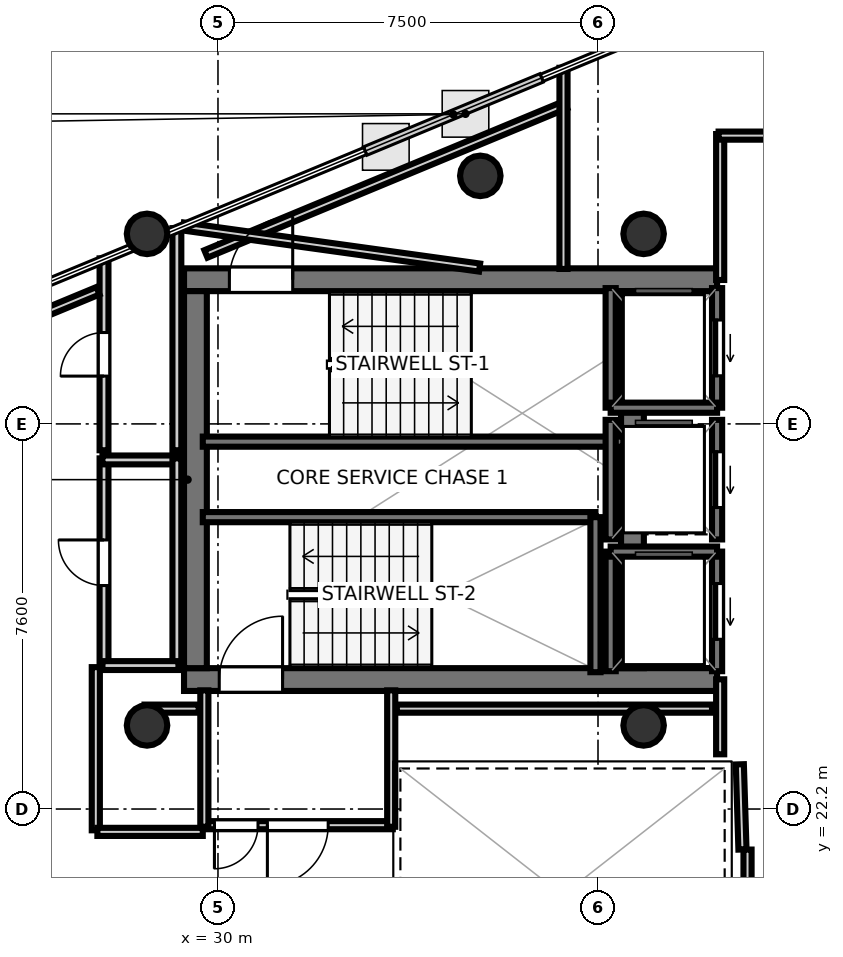
"""IFC4 building model, lengths in metres.
Left out: names, types, materials, properties, quantities, classifications, styles, units other than length and angle.
Written with IfcOpenShell. Run it as: python <this file> out.ifc"""

import sys

from ifc_helpers import new_model, si_unit, direction, frame, frame_2d, origin, origin_2d, place, context, subcontext, project, spatial, rectangle, hollow_circle, extrude, element, fill, save


model = new_model("IFC4")
c1 = context("Model", 3, precision=1e-05, world=origin(), true_north=direction((0.0, 1.0)))
c2 = subcontext(c1, "Body", "Model", "MODEL_VIEW")
j1 = project(units=[si_unit("LENGTHUNIT", "METRE"), si_unit("PLANEANGLEUNIT", "RADIAN")], contexts=[c1])
p1 = place(None, origin())
s1 = spatial("IfcSite", under=j1, at=p1, CompositionType="ELEMENT")
p2 = place(p1, origin())
s2 = spatial("IfcBuilding", under=s1, at=p2, CompositionType="ELEMENT")
p3 = place(p2, frame((0.0, 0.0, 348.1)))
s3 = spatial("IfcBuildingStorey", under=s2, at=p3, CompositionType="ELEMENT", Elevation=348.1)
p4 = place(p3, frame((29.33, 32.645, 0.0), z_axis=(0.0, 0.0, 1.0), x_axis=(1.0, 0.0, 0.0)))
e1 = element("IfcWall", 1, at=p4, inside=s3, PredefinedType="SHEAR", context=c2, shape_type="SweptSolid", body=[
    extrude(rectangle(XDim=10.52, YDim=0.45, at=frame_2d((5.26, 0.0))), origin(), (0.0, 0.0, 1.0), 3.4),
])
p5 = place(p4, frame((0.895, 0.0, 0.0)))
e2 = element("IfcOpeningElement", 2, at=p5, cuts=e1, PredefinedType="OPENING", context=c2, shape_type="SweptSolid", body=[
    extrude(rectangle(XDim=1.25, YDim=2.15, at=frame_2d((0.625, 1.075))), frame((0.0, 0.235, 0.0), z_axis=(0.0, -1.0, 0.0), x_axis=(1.0, 0.0, 0.0)), (0.0, 0.0, 1.0), 0.47),
])
p6 = place(p3, frame((29.33, 24.755, 0.0), z_axis=(0.0, 0.0, 1.0), x_axis=(1.0, 0.0, 0.0)))
e3 = element("IfcWall", 3, at=p6, inside=s3, PredefinedType="SHEAR", context=c2, shape_type="SweptSolid", body=[
    extrude(rectangle(XDim=10.52, YDim=0.45, at=frame_2d((5.26, 0.0))), origin(), (0.0, 0.0, 1.0), 3.4),
])
p7 = place(p6, frame((0.695, 0.0, 0.0)))
e4 = element("IfcOpeningElement", 4, at=p7, cuts=e3, PredefinedType="OPENING", context=c2, shape_type="SweptSolid", body=[
    extrude(rectangle(XDim=1.25, YDim=2.15, at=frame_2d((0.625, 1.075))), frame((0.0, 0.235, 0.0), z_axis=(0.0, -1.0, 0.0), x_axis=(1.0, 0.0, 0.0)), (0.0, 0.0, 1.0), 0.47),
])
for number, where, z_axis, x_axis in (
    (5, (29.555, 24.98, 0.0), (0.0, 0.0, 1.0), (0.0, 1.0, 0.0)),
    (6, (38.18, 24.98, 0.0), (0.0, 0.0, 1.0), (0.0, 1.0, 0.0)),
):
    element("IfcWall", number, at=place(p3, frame(where, z_axis=z_axis, x_axis=x_axis)), inside=s3, PredefinedType="SHEAR", context=c2, shape_type="SweptSolid", body=[
        extrude(rectangle(XDim=7.44, YDim=0.45, at=frame_2d((3.72, 0.0))), origin(), (0.0, 0.0, 1.0), 3.4),
    ])
for number, where, z_axis, x_axis in (
    (7, (28.6, 33.55, 0.0), (0.0, 0.0, 1.0), (1.0, 0.0, 0.0)),
    (8, (28.6, 23.85, 0.0), (0.0, 0.0, 1.0), (1.0, 0.0, 0.0)),
    (9, (38.4, 33.55, 0.0), (0.0, 0.0, 1.0), (1.0, 0.0, 0.0)),
    (10, (38.4, 23.85, 0.0), (0.0, 0.0, 1.0), (1.0, 0.0, 0.0)),
    (11, (35.177, 34.695, 0.0), (0.0, 0.0, 1.0), (1.0, 0.0, 0.0)),
):
    element("IfcColumn", number, at=place(p3, frame(where, z_axis=z_axis, x_axis=x_axis)), inside=s3, PredefinedType="COLUMN", context=c2, shape_type="SweptSolid", body=[
        extrude(hollow_circle(Radius=0.4, WallThickness=0.022, at=origin_2d()), origin(), (0.0, 0.0, 1.0), 3.7),
    ])
p8 = place(p3, frame((29.7, 29.45, 0.0), z_axis=(0.0, 0.0, 1.0), x_axis=(1.0, 0.0, 0.0)))
e12 = element("IfcWall", 12, at=p8, inside=s3, PredefinedType="SOLIDWALL", context=c2, shape_type="SweptSolid", body=[
    extrude(rectangle(XDim=8.3, YDim=0.2, at=frame_2d((4.15, 0.0))), origin(), (0.0, 0.0, 1.0), 3.4),
])
p9 = place(p3, frame((29.7, 27.96, 0.0), z_axis=(0.0, 0.0, 1.0), x_axis=(1.0, 0.0, 0.0)))
e13 = element("IfcWall", 13, at=p9, inside=s3, PredefinedType="SOLIDWALL", context=c2, shape_type="SweptSolid", body=[
    extrude(rectangle(XDim=7.75, YDim=0.2, at=frame_2d((3.875, 0.0))), origin(), (0.0, 0.0, 1.0), 3.4),
])
p10 = place(p3, frame((37.45, 24.9, 0.0), z_axis=(0.0, 0.0, 1.0), x_axis=(0.0, 1.0, 0.0)))
e14 = element("IfcWall", 14, at=p10, inside=s3, PredefinedType="SOLIDWALL", context=c2, shape_type="SweptSolid", body=[
    extrude(rectangle(XDim=3.06, YDim=0.2, at=frame_2d((1.53, 0.0))), origin(), (0.0, 0.0, 1.0), 3.4),
])
p11 = place(p3, frame((39.85, 30.12, 0.0), z_axis=(0.0, 0.0, 1.0), x_axis=(0.0, 1.0, 0.0)))
e15 = element("IfcWall", 15, at=p11, inside=s3, PredefinedType="SOLIDWALL", context=c2, shape_type="SweptSolid", body=[
    extrude(rectangle(XDim=2.36, YDim=0.2, at=frame_2d((1.18, 0.0))), origin(), (0.0, 0.0, 1.0), 3.4),
])
p12 = place(p11, frame((0.63, 0.0, 0.0)))
e16 = element("IfcOpeningElement", 16, at=p12, cuts=e15, PredefinedType="OPENING", context=c2, shape_type="SweptSolid", body=[
    extrude(rectangle(XDim=1.1, YDim=2.15, at=frame_2d((0.55, 1.075))), frame((0.0, 0.11, 0.0), z_axis=(0.0, -1.0, 0.0), x_axis=(1.0, 0.0, 0.0)), (0.0, 0.0, 1.0), 0.22),
])
p13 = place(p3, frame((37.75, 30.12, 0.0), z_axis=(0.0, 0.0, 1.0), x_axis=(0.0, 1.0, 0.0)))
e17 = element("IfcWall", 17, at=p13, inside=s3, PredefinedType="SOLIDWALL", context=c2, shape_type="SweptSolid", body=[
    extrude(rectangle(XDim=2.36, YDim=0.2, at=frame_2d((1.18, 0.0))), origin(), (0.0, 0.0, 1.0), 3.4),
])
p14 = place(p3, frame((37.75, 30.12, 0.0), z_axis=(0.0, 0.0, 1.0), x_axis=(1.0, 0.0, 0.0)))
e18 = element("IfcWall", 18, at=p14, inside=s3, PredefinedType="SOLIDWALL", context=c2, shape_type="SweptSolid", body=[
    extrude(rectangle(XDim=2.1, YDim=0.2, at=frame_2d((1.05, 0.0))), origin(), (0.0, 0.0, 1.0), 3.4),
])
p15 = place(p3, frame((39.85, 24.92, 0.0), z_axis=(0.0, 0.0, 1.0), x_axis=(0.0, 1.0, 0.0)))
e19 = element("IfcWall", 19, at=p15, inside=s3, PredefinedType="SOLIDWALL", context=c2, shape_type="SweptSolid", body=[
    extrude(rectangle(XDim=2.36, YDim=0.2, at=frame_2d((1.18, 0.0))), origin(), (0.0, 0.0, 1.0), 3.4),
])
p16 = place(p15, frame((0.63, 0.0, 0.0)))
e20 = element("IfcOpeningElement", 20, at=p16, cuts=e19, PredefinedType="OPENING", context=c2, shape_type="SweptSolid", body=[
    extrude(rectangle(XDim=1.1, YDim=2.15, at=frame_2d((0.55, 1.075))), frame((0.0, 0.11, 0.0), z_axis=(0.0, -1.0, 0.0), x_axis=(1.0, 0.0, 0.0)), (0.0, 0.0, 1.0), 0.22),
])
p17 = place(p3, frame((37.75, 24.92, 0.0), z_axis=(0.0, 0.0, 1.0), x_axis=(0.0, 1.0, 0.0)))
e21 = element("IfcWall", 21, at=p17, inside=s3, PredefinedType="SOLIDWALL", context=c2, shape_type="SweptSolid", body=[
    extrude(rectangle(XDim=2.36, YDim=0.2, at=frame_2d((1.18, 0.0))), origin(), (0.0, 0.0, 1.0), 3.4),
])
p18 = place(p3, frame((37.75, 27.28, 0.0), z_axis=(0.0, 0.0, 1.0), x_axis=(1.0, 0.0, 0.0)))
e22 = element("IfcWall", 22, at=p18, inside=s3, PredefinedType="SOLIDWALL", context=c2, shape_type="SweptSolid", body=[
    extrude(rectangle(XDim=2.1, YDim=0.2, at=frame_2d((1.05, 0.0))), origin(), (0.0, 0.0, 1.0), 3.4),
])
p19 = place(p3, frame((39.85, 27.52, 0.0), z_axis=(0.0, 0.0, 1.0), x_axis=(0.0, 1.0, 0.0)))
e23 = element("IfcWall", 23, at=p19, inside=s3, PredefinedType="SOLIDWALL", context=c2, shape_type="SweptSolid", body=[
    extrude(rectangle(XDim=2.36, YDim=0.2, at=frame_2d((1.18, 0.0))), origin(), (0.0, 0.0, 1.0), 3.4),
])
p20 = place(p19, frame((0.63, 0.0, 0.0)))
e24 = element("IfcOpeningElement", 24, at=p20, cuts=e23, PredefinedType="OPENING", context=c2, shape_type="SweptSolid", body=[
    extrude(rectangle(XDim=1.1, YDim=2.15, at=frame_2d((0.55, 1.075))), frame((0.0, 0.11, 0.0), z_axis=(0.0, -1.0, 0.0), x_axis=(1.0, 0.0, 0.0)), (0.0, 0.0, 1.0), 0.22),
])
p21 = place(p3, frame((37.75, 27.52, 0.0), z_axis=(0.0, 0.0, 1.0), x_axis=(0.0, 1.0, 0.0)))
e25 = element("IfcWall", 25, at=p21, inside=s3, PredefinedType="SOLIDWALL", context=c2, shape_type="SweptSolid", body=[
    extrude(rectangle(XDim=2.36, YDim=0.2, at=frame_2d((1.18, 0.0))), origin(), (0.0, 0.0, 1.0), 3.4),
])
p22 = place(p3, frame((29.762, 33.154, 0.0), z_axis=(0.0, 0.0, 1.0), x_axis=(0.923696881278, 0.38312409415, 0.0)))
e26 = element("IfcWall", 26, at=p22, inside=s3, PredefinedType="PARTITIONING", context=c2, shape_type="SweptSolid", body=[
    extrude(rectangle(XDim=7.686, YDim=0.16, at=frame_2d((3.843, 0.0))), origin(), (0.0, 0.0, 1.0), 2.178),
])
p23 = place(p3, frame((36.819, 36.828, 0.0), z_axis=(0.0, 0.0, 1.0), x_axis=(0.0, -1.0, 0.0)))
e27 = element("IfcWall", 27, at=p23, inside=s3, PredefinedType="PARTITIONING", context=c2, shape_type="SweptSolid", body=[
    extrude(rectangle(XDim=3.97, YDim=0.16, at=frame_2d((1.985, 0.0))), origin(), (0.0, 0.0, 1.0), 2.178),
])
p24 = place(p3, frame((35.163, 32.885, 0.0), z_axis=(0.0, 0.0, 1.0), x_axis=(-0.990514647944, 0.137407176701, 0.0)))
e28 = element("IfcWall", 28, at=p24, inside=s3, PredefinedType="PARTITIONING", context=c2, shape_type="SweptSolid", body=[
    extrude(rectangle(XDim=5.902, YDim=0.16, at=frame_2d((2.951, 0.0))), origin(), (0.0, 0.0, 1.0), 2.35),
])
p25 = place(p3, frame((33.45, 21.881, 0.0), z_axis=(0.0, 0.0, 1.0), x_axis=(-1.0, 0.0, 0.0)))
e29 = element("IfcWall", 29, at=p25, inside=s3, PredefinedType="PARTITIONING", context=c2, shape_type="SweptSolid", body=[
    extrude(rectangle(XDim=3.75, YDim=0.16, at=frame_2d((1.875, 0.0))), origin(), (0.0, 0.0, 1.0), 2.35),
])
p26 = place(p25, frame((1.275, 0.0, 0.0)))
e30 = element("IfcOpeningElement", 30, at=p26, cuts=e29, PredefinedType="OPENING", context=c2, shape_type="SweptSolid", body=[
    extrude(rectangle(XDim=1.2, YDim=2.15, at=frame_2d((0.6, 1.075))), frame((0.0, 0.09, 0.0), z_axis=(0.0, -1.0, 0.0), x_axis=(1.0, 0.0, 0.0)), (0.0, 0.0, 1.0), 0.18),
])
p27 = place(p25, frame((2.66, 0.0, 0.0)))
e31 = element("IfcOpeningElement", 31, at=p27, cuts=e29, PredefinedType="OPENING", context=c2, shape_type="SweptSolid", body=[
    extrude(rectangle(XDim=0.86, YDim=2.05, at=frame_2d((0.43, 1.025))), frame((0.0, 0.09, 0.0), z_axis=(0.0, -1.0, 0.0), x_axis=(1.0, 0.0, 0.0)), (0.0, 0.0, 1.0), 0.18),
])
for number, where, z_axis, x_axis in (
    (32, (29.731, 21.85, 0.0), (0.0, 0.0, 1.0), (0.0, 1.0, 0.0)),
    (33, (33.419, 24.542, 0.0), (0.0, 0.0, 1.0), (0.0, -1.0, 0.0)),
):
    element("IfcWall", number, at=place(p3, frame(where, z_axis=z_axis, x_axis=x_axis)), inside=s3, PredefinedType="PARTITIONING", context=c2, shape_type="SweptSolid", body=[
        extrude(rectangle(XDim=2.692, YDim=0.16, at=frame_2d((1.346, 0.0))), origin(), (0.0, 0.0, 1.0), 2.35),
    ])
p28 = place(p3, frame((40.351, 21.401, 0.0), z_axis=(0.0, 0.0, 1.0), x_axis=(-0.031058045979, 0.999517582527, 0.0)))
e34 = element("IfcWall", 34, at=p28, inside=s3, PredefinedType="PARTITIONING", context=c2, shape_type="SweptSolid", body=[
    extrude(rectangle(XDim=1.682, YDim=0.16, at=frame_2d((0.841, 0.0))), origin(), (0.0, 0.0, 1.0), 2.35),
])
p29 = place(p3, frame((39.911, 23.28, 0.0), z_axis=(0.0, 0.0, 1.0), x_axis=(0.0, 1.0, 0.0)))
e35 = element("IfcWall", 35, at=p29, inside=s3, PredefinedType="PARTITIONING", context=c2, shape_type="SweptSolid", body=[
    extrude(rectangle(XDim=1.48, YDim=0.16, at=frame_2d((0.74, 0.0))), origin(), (0.0, 0.0, 1.0), 2.35),
])
p30 = place(p3, frame((39.911, 32.64, 0.0), z_axis=(0.0, 0.0, 1.0), x_axis=(0.0, 1.0, 0.0)))
e36 = element("IfcWall", 36, at=p30, inside=s3, PredefinedType="PARTITIONING", context=c2, shape_type="SweptSolid", body=[
    extrude(rectangle(XDim=2.88, YDim=0.16, at=frame_2d((1.44, 0.0))), origin(), (0.0, 0.0, 1.0), 2.35),
])
p31 = place(p3, frame((39.88, 35.489, 0.0), z_axis=(0.0, 0.0, 1.0), x_axis=(1.0, 0.0, 0.0)))
e37 = element("IfcWall", 37, at=p31, inside=s3, PredefinedType="PARTITIONING", context=c2, shape_type="SweptSolid", body=[
    extrude(rectangle(XDim=1.48, YDim=0.16, at=frame_2d((0.74, 0.0))), origin(), (0.0, 0.0, 1.0), 2.35),
])
p32 = place(p3, frame((40.451, 18.08, 0.0), z_axis=(0.0, 0.0, 1.0), x_axis=(0.0, 1.0, 0.0)))
e38 = element("IfcWall", 38, at=p32, inside=s3, PredefinedType="PARTITIONING", context=c2, shape_type="SweptSolid", body=[
    extrude(rectangle(XDim=3.32, YDim=0.16, at=frame_2d((1.66, 0.0))), origin(), (0.0, 0.0, 1.0), 2.35),
])
p33 = place(p3, frame((27.751, 25.0, 0.0), z_axis=(0.0, 0.0, 1.0), x_axis=(0.0, 1.0, 0.0)))
e39 = element("IfcWall", 39, at=p33, inside=s3, PredefinedType="PLUMBINGWALL", context=c2, shape_type="SweptSolid", body=[
    extrude(rectangle(XDim=4.12, YDim=0.175, at=frame_2d((2.06, 0.0))), origin(), (0.0, 0.0, 1.0), 2.35),
])
p34 = place(p33, frame((1.61, 0.0, 0.0)))
e40 = element("IfcOpeningElement", 40, at=p34, cuts=e39, PredefinedType="OPENING", context=c2, shape_type="SweptSolid", body=[
    extrude(rectangle(XDim=0.9, YDim=2.1, at=frame_2d((0.45, 1.05))), frame((0.0, 0.097, 0.0), z_axis=(0.0, -1.0, 0.0), x_axis=(1.0, 0.0, 0.0)), (0.0, 0.0, 1.0), 0.195),
])
p35 = place(p3, frame((27.72, 29.089, 0.0), z_axis=(0.0, 0.0, 1.0), x_axis=(1.0, 0.0, 0.0)))
e41 = element("IfcWall", 41, at=p35, inside=s3, PredefinedType="PLUMBINGWALL", context=c2, shape_type="SweptSolid", body=[
    extrude(rectangle(XDim=1.5, YDim=0.175, at=frame_2d((0.75, 0.0))), origin(), (0.0, 0.0, 1.0), 2.35),
])
p36 = place(p3, frame((29.189, 29.12, 0.0), z_axis=(0.0, 0.0, 1.0), x_axis=(0.0, -1.0, 0.0)))
e42 = element("IfcWall", 42, at=p36, inside=s3, PredefinedType="PLUMBINGWALL", context=c2, shape_type="SweptSolid", body=[
    extrude(rectangle(XDim=4.12, YDim=0.175, at=frame_2d((2.06, 0.0))), origin(), (0.0, 0.0, 1.0), 2.35),
])
p37 = place(p3, frame((29.22, 25.031, 0.0), z_axis=(0.0, 0.0, 1.0), x_axis=(-1.0, 0.0, 0.0)))
e43 = element("IfcWall", 43, at=p37, inside=s3, PredefinedType="PLUMBINGWALL", context=c2, shape_type="SweptSolid", body=[
    extrude(rectangle(XDim=1.5, YDim=0.175, at=frame_2d((0.75, 0.0))), origin(), (0.0, 0.0, 1.0), 2.35),
])
p38 = place(p3, frame((29.189, 33.663, 0.0), z_axis=(0.0, 0.0, 1.0), x_axis=(0.0, -1.0, 0.0)))
e44 = element("IfcWall", 44, at=p38, inside=s3, PredefinedType="PLUMBINGWALL", context=c2, shape_type="SweptSolid", body=[
    extrude(rectangle(XDim=4.383, YDim=0.175, at=frame_2d((2.191, 0.0))), origin(), (0.0, 0.0, 1.0), 2.35),
])
p39 = place(p3, frame((27.751, 29.28, 0.0), z_axis=(0.0, 0.0, 1.0), x_axis=(0.0, 1.0, 0.0)))
e45 = element("IfcWall", 45, at=p39, inside=s3, PredefinedType="PLUMBINGWALL", context=c2, shape_type="SweptSolid", body=[
    extrude(rectangle(XDim=3.787, YDim=0.175, at=frame_2d((1.893, 0.0))), origin(), (0.0, 0.0, 1.0), 2.35),
])
p40 = place(p39, frame((1.463, 0.0, 0.0)))
e46 = element("IfcOpeningElement", 46, at=p40, cuts=e45, PredefinedType="OPENING", context=c2, shape_type="SweptSolid", body=[
    extrude(rectangle(XDim=0.86, YDim=2.05, at=frame_2d((0.43, 1.025))), frame((0.0, 0.097, 0.0), z_axis=(0.0, -1.0, 0.0), x_axis=(1.0, 0.0, 0.0)), (0.0, 0.0, 1.0), 0.195),
])
p41 = place(p3, frame((29.62, 24.181, 0.0), z_axis=(0.0, 0.0, 1.0), x_axis=(-1.0, 0.0, 0.0)))
e47 = element("IfcWall", 47, at=p41, inside=s3, PredefinedType="PARTITIONING", context=c2, shape_type="SweptSolid", body=[
    extrude(rectangle(XDim=1.07, YDim=0.16, at=frame_2d((0.535, 0.0))), origin(), (0.0, 0.0, 1.0), 2.35),
])
p42 = place(p3, frame((39.75, 24.181, 0.0), z_axis=(0.0, 0.0, 1.0), x_axis=(-1.0, 0.0, 0.0)))
e48 = element("IfcWall", 48, at=p42, inside=s3, PredefinedType="PARTITIONING", context=c2, shape_type="SweptSolid", body=[
    extrude(rectangle(XDim=6.22, YDim=0.16, at=frame_2d((3.11, 0.0))), origin(), (0.0, 0.0, 1.0), 2.35),
])
p43 = place(p3, frame((25.662, 31.611, 0.0), z_axis=(0.0, 0.0, 1.0), x_axis=(0.923688761003, 0.38314367122, 0.0)))
e49 = element("IfcWall", 49, at=p43, inside=s3, PredefinedType="PARTITIONING", context=c2, shape_type="SweptSolid", body=[
    extrude(rectangle(XDim=2.133, YDim=0.16, at=frame_2d((1.066, 0.0))), origin(), (0.0, 0.0, 1.0), 2.35),
])
p44 = place(p3, frame((27.589, 25.0, 0.0), z_axis=(0.0, 0.0, 1.0), x_axis=(0.0, -1.0, 0.0)))
e50 = element("IfcWall", 50, at=p44, inside=s3, PredefinedType="PARTITIONING", context=c2, shape_type="SweptSolid", body=[
    extrude(rectangle(XDim=3.22, YDim=0.16, at=frame_2d((1.61, 0.0))), origin(), (0.0, 0.0, 1.0), 2.35),
])
p45 = place(p3, frame((27.62, 21.749, 0.0), z_axis=(0.0, 0.0, 1.0), x_axis=(1.0, 0.0, 0.0)))
e51 = element("IfcWall", 51, at=p45, inside=s3, PredefinedType="PARTITIONING", context=c2, shape_type="SweptSolid", body=[
    extrude(rectangle(XDim=2.08, YDim=0.16, at=frame_2d((1.04, 0.0))), origin(), (0.0, 0.0, 1.0), 2.35),
])
p46 = place(p5, origin())
e52 = element("IfcDoor", 52, at=p46, inside=s3, OperationType="SINGLE_SWING_RIGHT", PredefinedType="DOOR", context=c2, shape_type="SweptSolid", body=[
    extrude(rectangle(XDim=1.25, YDim=2.15, at=frame_2d((0.625, 1.075))), frame((0.0, 0.025, 0.0), z_axis=(0.0, -1.0, 0.0), x_axis=(1.0, 0.0, 0.0)), (0.0, 0.0, 1.0), 0.05),
])
fill(e2, e52)
p47 = place(p7, origin())
e53 = element("IfcDoor", 53, at=p47, inside=s3, OperationType="SINGLE_SWING_RIGHT", PredefinedType="DOOR", context=c2, shape_type="SweptSolid", body=[
    extrude(rectangle(XDim=1.25, YDim=2.15, at=frame_2d((0.625, 1.075))), frame((0.0, 0.025, 0.0), z_axis=(0.0, -1.0, 0.0), x_axis=(1.0, 0.0, 0.0)), (0.0, 0.0, 1.0), 0.05),
])
fill(e4, e53)
p48 = place(p12, origin())
e54 = element("IfcDoor", 54, at=p48, inside=s3, OperationType="SLIDING_TO_LEFT", PredefinedType="DOOR", context=c2, shape_type="SweptSolid", body=[
    extrude(rectangle(XDim=1.1, YDim=2.15, at=frame_2d((0.55, 1.075))), frame((0.0, 0.025, 0.0), z_axis=(0.0, -1.0, 0.0), x_axis=(1.0, 0.0, 0.0)), (0.0, 0.0, 1.0), 0.05),
])
fill(e16, e54)
p49 = place(p16, origin())
e55 = element("IfcDoor", 55, at=p49, inside=s3, OperationType="SLIDING_TO_LEFT", PredefinedType="DOOR", context=c2, shape_type="SweptSolid", body=[
    extrude(rectangle(XDim=1.1, YDim=2.15, at=frame_2d((0.55, 1.075))), frame((0.0, 0.025, 0.0), z_axis=(0.0, -1.0, 0.0), x_axis=(1.0, 0.0, 0.0)), (0.0, 0.0, 1.0), 0.05),
])
fill(e20, e55)
p50 = place(p20, origin())
e56 = element("IfcDoor", 56, at=p50, inside=s3, OperationType="SLIDING_TO_LEFT", PredefinedType="DOOR", context=c2, shape_type="SweptSolid", body=[
    extrude(rectangle(XDim=1.1, YDim=2.15, at=frame_2d((0.55, 1.075))), frame((0.0, 0.025, 0.0), z_axis=(0.0, -1.0, 0.0), x_axis=(1.0, 0.0, 0.0)), (0.0, 0.0, 1.0), 0.05),
])
fill(e24, e56)
p51 = place(p26, origin())
e57 = element("IfcDoor", 57, at=p51, inside=s3, OperationType="SINGLE_SWING_RIGHT", PredefinedType="DOOR", context=c2, shape_type="SweptSolid", body=[
    extrude(rectangle(XDim=1.2, YDim=2.15, at=frame_2d((0.6, 1.075))), frame((0.0, 0.025, 0.0), z_axis=(0.0, -1.0, 0.0), x_axis=(1.0, 0.0, 0.0)), (0.0, 0.0, 1.0), 0.05),
])
fill(e30, e57)
p52 = place(p34, origin())
e58 = element("IfcDoor", 58, at=p52, inside=s3, OperationType="SINGLE_SWING_RIGHT", PredefinedType="DOOR", context=c2, shape_type="SweptSolid", body=[
    extrude(rectangle(XDim=0.9, YDim=2.1, at=frame_2d((0.45, 1.05))), frame((0.0, 0.025, 0.0), z_axis=(0.0, -1.0, 0.0), x_axis=(1.0, 0.0, 0.0)), (0.0, 0.0, 1.0), 0.05),
])
fill(e40, e58)
p53 = place(p40, origin())
e59 = element("IfcDoor", 59, at=p53, inside=s3, OperationType="SINGLE_SWING_LEFT", PredefinedType="DOOR", context=c2, shape_type="SweptSolid", body=[
    extrude(rectangle(XDim=0.86, YDim=2.05, at=frame_2d((0.43, 1.025))), frame((0.0, 0.025, 0.0), z_axis=(0.0, -1.0, 0.0), x_axis=(1.0, 0.0, 0.0)), (0.0, 0.0, 1.0), 0.05),
])
fill(e46, e59)
p54 = place(p27, origin())
e60 = element("IfcDoor", 60, at=p54, inside=s3, OperationType="SINGLE_SWING_RIGHT", PredefinedType="DOOR", context=c2, shape_type="SweptSolid", body=[
    extrude(rectangle(XDim=0.86, YDim=2.05, at=frame_2d((0.43, 1.025))), frame((0.0, 0.025, 0.0), z_axis=(0.0, -1.0, 0.0), x_axis=(1.0, 0.0, 0.0)), (0.0, 0.0, 1.0), 0.05),
])
fill(e31, e60)
save(model, sys.argv[1])
